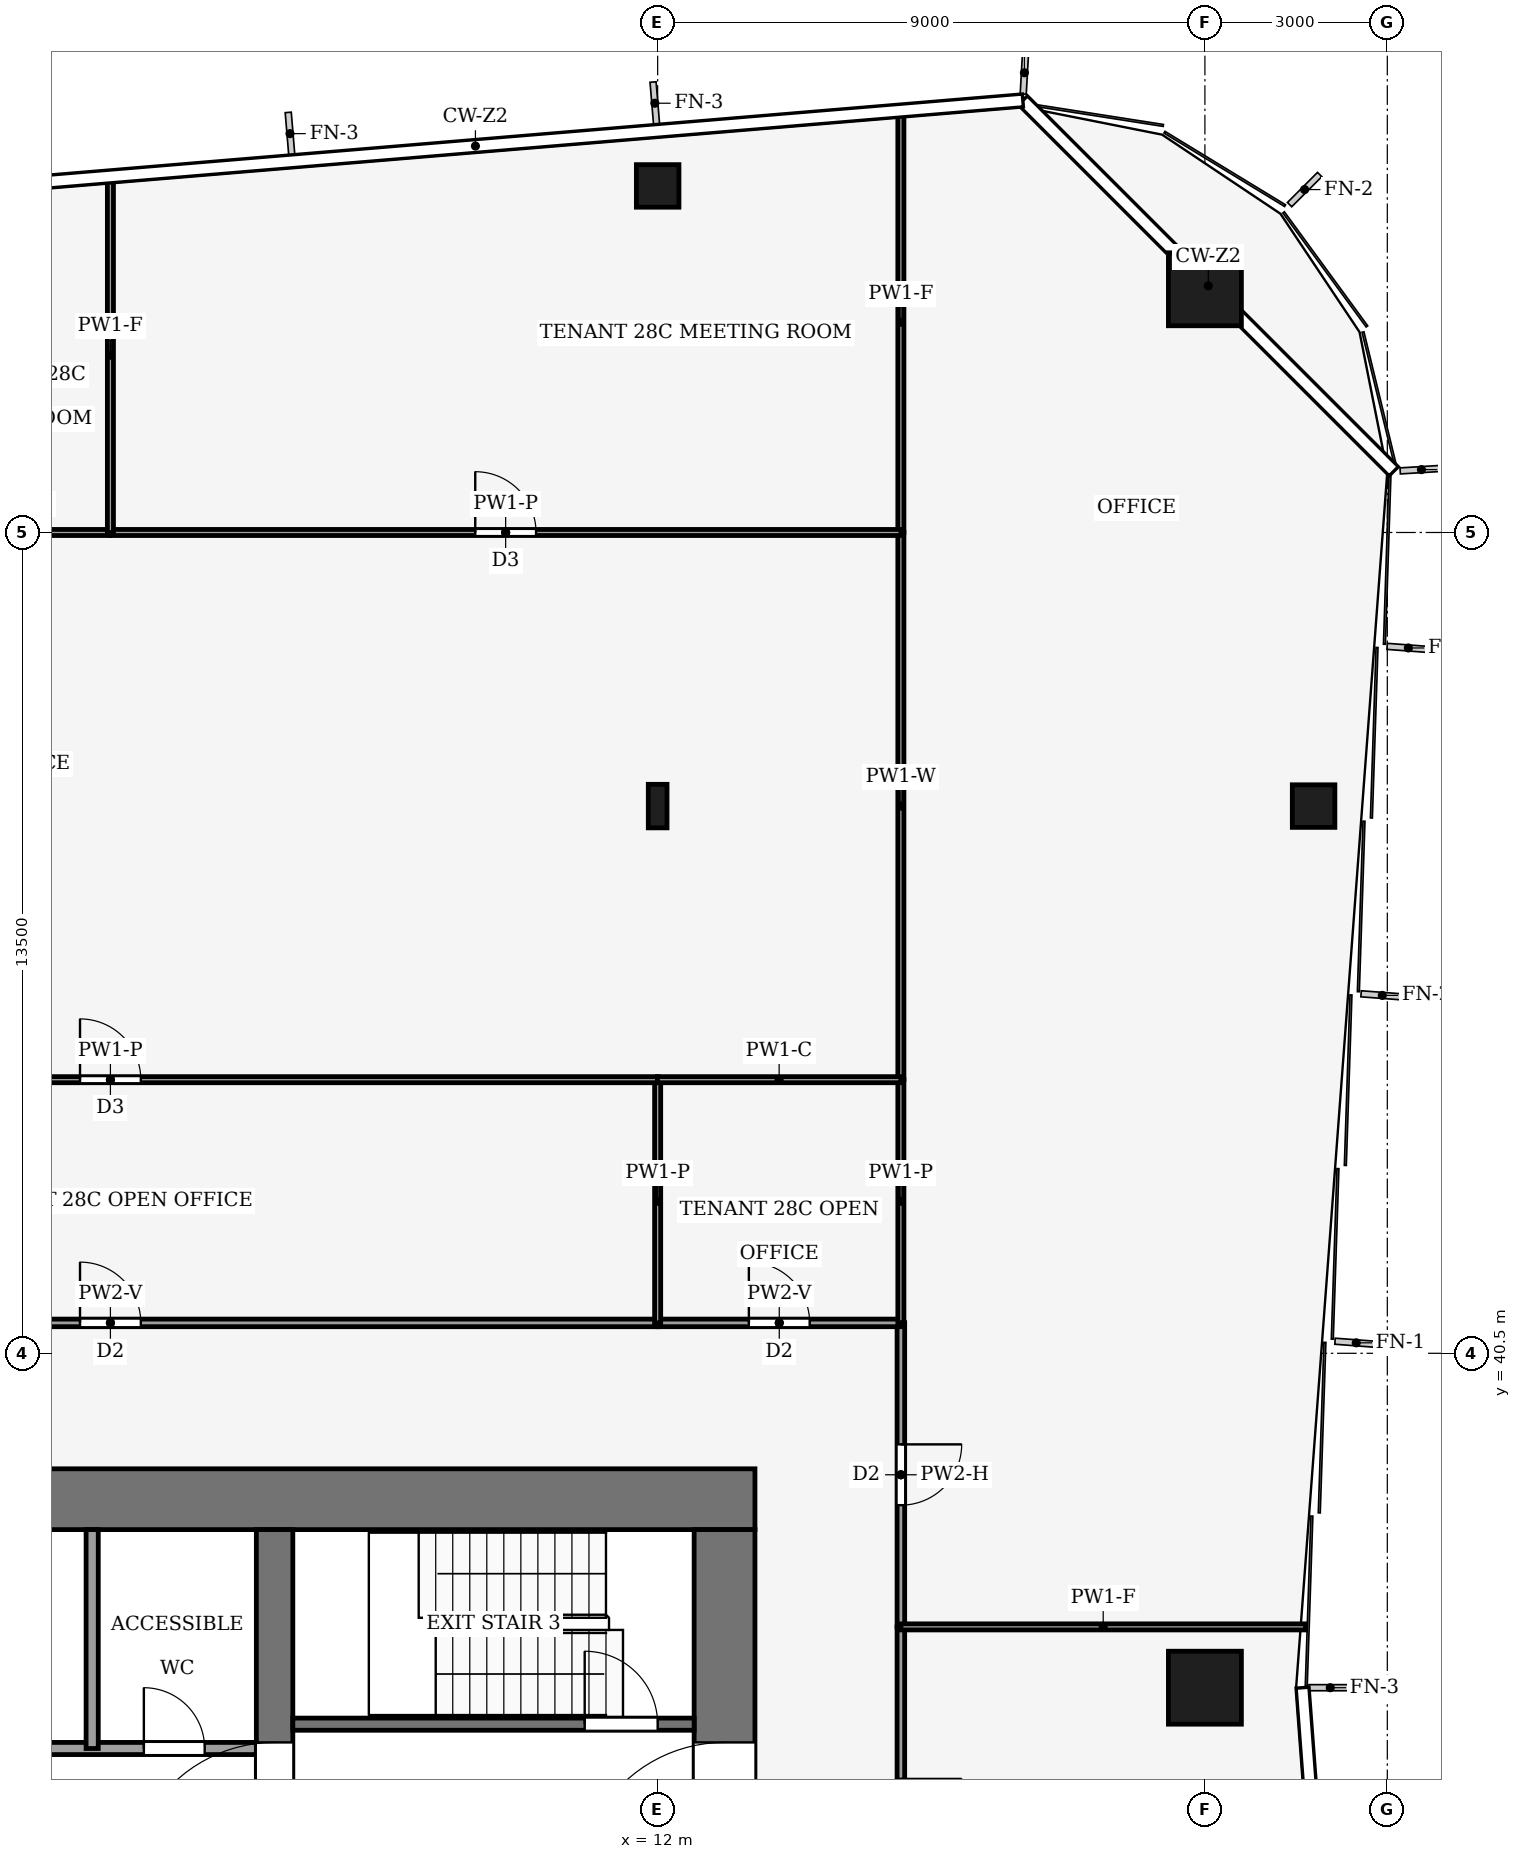
"""IFC4 building model, lengths in metres.
Left out: names, types, materials, properties, quantities, classifications, styles, units other than length and angle.
Written with IfcOpenShell. Run it as: python <this file> out.ifc"""

import sys

from ifc_helpers import new_model, si_unit, direction, frame, frame_2d, origin, origin_2d, place, context, subcontext, project, spatial, rectangle, hollow_rectangle, i_section, extrude, element, fill, save


model = new_model("IFC4")
c1 = context("Model", 3, precision=1e-05, world=origin(), true_north=direction((0.0, 1.0)))
c2 = subcontext(c1, "Body", "Model", "MODEL_VIEW")
j1 = project(units=[si_unit("LENGTHUNIT", "METRE"), si_unit("PLANEANGLEUNIT", "RADIAN")], contexts=[c1])
p1 = place(None, origin())
s1 = spatial("IfcSite", under=j1, at=p1, CompositionType="ELEMENT")
p2 = place(p1, origin())
s2 = spatial("IfcBuilding", under=s1, at=p2, CompositionType="ELEMENT")
p3 = place(p2, frame((0.0, 0.0, 126.0)))
s3 = spatial("IfcBuildingStorey", under=s2, at=p3, CompositionType="ELEMENT", Elevation=126.0)
p4 = place(p3, frame((-13.6, 38.1, -0.13), z_axis=(0.0, 0.0, 1.0), x_axis=(1.0, 0.0, 0.0)))
e1 = element("IfcWall", 1, at=p4, inside=s3, PredefinedType="SHEAR", context=c2, shape_type="SweptSolid", body=[
    extrude(rectangle(XDim=27.2, YDim=1.0, at=frame_2d((13.6, 0.0))), origin(), (0.0, 0.0, 1.0), 4.0),
])
p5 = place(p3, frame((13.1, 18.4, -0.13), z_axis=(0.0, 0.0, 1.0), x_axis=(0.0, 1.0, 0.0)))
e2 = element("IfcWall", 2, at=p5, inside=s3, PredefinedType="SHEAR", context=c2, shape_type="SweptSolid", body=[
    extrude(rectangle(XDim=19.2, YDim=1.0, at=frame_2d((9.6, 0.0))), origin(), (0.0, 0.0, 1.0), 4.0),
])
p6 = place(p5, frame((2.8, 0.0, 0.13)))
e3 = element("IfcOpeningElement", 3, at=p6, cuts=e2, PredefinedType="OPENING", context=c2, shape_type="SweptSolid", body=[
    extrude(rectangle(XDim=2.4, YDim=2.4, at=frame_2d((1.2, 1.2))), frame((0.0, 0.51, 0.0), z_axis=(0.0, -1.0, 0.0), x_axis=(1.0, 0.0, 0.0)), (0.0, 0.0, 1.0), 1.02),
])
p7 = place(p5, frame((13.3, 0.0, 0.13)))
e4 = element("IfcOpeningElement", 4, at=p7, cuts=e2, PredefinedType="OPENING", context=c2, shape_type="SweptSolid", body=[
    extrude(rectangle(XDim=2.4, YDim=2.4, at=frame_2d((1.2, 1.2))), frame((0.0, 0.51, 0.0), z_axis=(0.0, -1.0, 0.0), x_axis=(1.0, 0.0, 0.0)), (0.0, 0.0, 1.0), 1.02),
])
p8 = place(p3, frame((5.7, 18.4, -0.13), z_axis=(0.0, 0.0, 1.0), x_axis=(0.0, 1.0, 0.0)))
e5 = element("IfcWall", 5, at=p8, inside=s3, PredefinedType="SHEAR", context=c2, shape_type="SweptSolid", body=[
    extrude(rectangle(XDim=19.2, YDim=0.6, at=frame_2d((9.6, 0.0))), origin(), (0.0, 0.0, 1.0), 4.0),
])
p9 = place(p8, frame((13.3, 0.0, 0.13)))
e6 = element("IfcOpeningElement", 6, at=p9, cuts=e5, PredefinedType="OPENING", context=c2, shape_type="SweptSolid", body=[
    extrude(rectangle(XDim=2.4, YDim=2.4, at=frame_2d((1.2, 1.2))), frame((0.0, 0.31, 0.0), z_axis=(0.0, -1.0, 0.0), x_axis=(1.0, 0.0, 0.0)), (0.0, 0.0, 1.0), 0.62),
])
for number, where, z_axis, x_axis in (
    (7, (21.0, 58.0, 0.0), (0.0, 0.0, 1.0), (1.0, 0.0, 0.0)),
    (8, (21.0, 35.0, 0.0), (0.0, 0.0, 1.0), (1.0, 0.0, 0.0)),
):
    element("IfcColumn", number, at=place(p3, frame(where, z_axis=z_axis, x_axis=x_axis)), inside=s3, PredefinedType="COLUMN", context=c2, shape_type="SweptSolid", body=[
        extrude(hollow_rectangle(XDim=1.2, YDim=1.2, WallThickness=0.07, at=origin_2d()), origin(), (0.0, 0.0, 1.0), 4.0),
    ])
for number, where, z_axis, x_axis in (
    (9, (12.0, 59.7, 0.0), (0.0, 0.0, 1.0), (1.0, 0.0, 0.0)),
    (10, (22.788, 49.5, 0.0), (0.0, 0.0, 1.0), (1.0, 0.0, 0.0)),
):
    element("IfcColumn", number, at=place(p3, frame(where, z_axis=z_axis, x_axis=x_axis)), inside=s3, PredefinedType="COLUMN", context=c2, shape_type="SweptSolid", body=[
        extrude(hollow_rectangle(XDim=0.7, YDim=0.7, WallThickness=0.03, at=origin_2d()), origin(), (0.0, 0.0, 1.0), 4.0),
    ])
p10 = place(p3, frame((12.0, 49.5, 0.0), z_axis=(0.0, 0.0, 1.0), x_axis=(1.0, 0.0, 0.0)))
e11 = element("IfcColumn", 11, at=p10, inside=s3, PredefinedType="COLUMN", context=c2, shape_type="SweptSolid", body=[
    extrude(i_section(OverallWidth=0.308, OverallDepth=0.716, WebThickness=0.021, FlangeThickness=0.04, FilletRadius=0.027, at=origin_2d()), origin(), (0.0, 0.0, 1.0), 4.0),
])
p11 = place(p3, frame((-5.4, 34.0, 0.0), z_axis=(0.0, 0.0, 1.0), x_axis=(1.0, 0.0, 0.0)))
e12 = element("IfcWall", 12, at=p11, inside=s3, PredefinedType="PARTITIONING", context=c2, shape_type="SweptSolid", body=[
    extrude(rectangle(XDim=10.8, YDim=0.2, at=frame_2d((5.4, 0.0))), origin(), (0.0, 0.0, 1.0), 3.87),
])
p12 = place(p11, frame((6.15, 0.0, 0.0)))
e13 = element("IfcOpeningElement", 13, at=p12, cuts=e12, PredefinedType="OPENING", context=c2, shape_type="SweptSolid", body=[
    extrude(rectangle(XDim=1.2, YDim=2.2, at=frame_2d((0.6, 1.1))), frame((0.0, 0.11, 0.0), z_axis=(0.0, -1.0, 0.0), x_axis=(1.0, 0.0, 0.0)), (0.0, 0.0, 1.0), 0.22),
])
p13 = place(p11, frame((8.95, 0.0, 0.0)))
e14 = element("IfcOpeningElement", 14, at=p13, cuts=e12, PredefinedType="OPENING", context=c2, shape_type="SweptSolid", body=[
    extrude(rectangle(XDim=1.0, YDim=2.1, at=frame_2d((0.5, 1.05))), frame((0.0, 0.11, 0.0), z_axis=(0.0, -1.0, 0.0), x_axis=(1.0, 0.0, 0.0)), (0.0, 0.0, 1.0), 0.22),
])
p14 = place(p3, frame((6.0, 34.4, 0.0), z_axis=(0.0, 0.0, 1.0), x_axis=(1.0, 0.0, 0.0)))
e15 = element("IfcWall", 15, at=p14, inside=s3, PredefinedType="PARTITIONING", context=c2, shape_type="SweptSolid", body=[
    extrude(rectangle(XDim=6.6, YDim=0.2, at=frame_2d((3.3, 0.0))), origin(), (0.0, 0.0, 1.0), 3.87),
])
p15 = place(p14, frame((4.8, 0.0, 0.0)))
e16 = element("IfcOpeningElement", 16, at=p15, cuts=e15, PredefinedType="OPENING", context=c2, shape_type="SweptSolid", body=[
    extrude(rectangle(XDim=1.2, YDim=2.2, at=frame_2d((0.6, 1.1))), frame((0.0, 0.11, 0.0), z_axis=(0.0, -1.0, 0.0), x_axis=(1.0, 0.0, 0.0)), (0.0, 0.0, 1.0), 0.22),
])
p16 = place(p3, frame((2.7, 34.0, 0.0), z_axis=(0.0, 0.0, 1.0), x_axis=(0.0, 1.0, 0.0)))
e17 = element("IfcWall", 17, at=p16, inside=s3, PredefinedType="PARTITIONING", context=c2, shape_type="SweptSolid", body=[
    extrude(rectangle(XDim=3.6, YDim=0.2, at=frame_2d((1.8, 0.0))), origin(), (0.0, 0.0, 1.0), 3.87),
])
p17 = place(p3, frame((16.0, 36.0, 0.0), z_axis=(0.0, 0.0, 1.0), x_axis=(0.0, -1.0, 0.0)))
e18 = element("IfcWall", 18, at=p17, inside=s3, PredefinedType="PARTITIONING", context=c2, shape_type="SweptSolid", body=[
    extrude(rectangle(XDim=6.0, YDim=0.125, at=frame_2d((3.0, 0.0))), origin(), (0.0, 0.0, 1.0), 3.48),
])
p18 = place(p17, frame((2.5, 0.0, 0.0)))
e19 = element("IfcOpeningElement", 19, at=p18, cuts=e18, PredefinedType="OPENING", context=c2, shape_type="SweptSolid", body=[
    extrude(rectangle(XDim=1.0, YDim=2.1, at=frame_2d((0.5, 1.05))), frame((0.0, 0.073, 0.0), z_axis=(0.0, -1.0, 0.0), x_axis=(1.0, 0.0, 0.0)), (0.0, 0.0, 1.0), 0.145),
])
p19 = place(p3, frame((16.0, 41.004, 0.0), z_axis=(0.0, 0.0, 1.0), x_axis=(0.0, -1.0, 0.0)))
e20 = element("IfcWall", 20, at=p19, inside=s3, PredefinedType="PARTITIONING", context=c2, shape_type="SweptSolid", body=[
    extrude(rectangle(XDim=5.004, YDim=0.125, at=frame_2d((2.502, 0.0))), origin(), (0.0, 0.0, 1.0), 3.14),
])
p20 = place(p19, frame((2.002, 0.0, 0.0)))
e21 = element("IfcOpeningElement", 21, at=p20, cuts=e20, PredefinedType="OPENING", context=c2, shape_type="SweptSolid", body=[
    extrude(rectangle(XDim=1.0, YDim=2.1, at=frame_2d((0.5, 1.05))), frame((0.0, 0.073, 0.0), z_axis=(0.0, -1.0, 0.0), x_axis=(1.0, 0.0, 0.0)), (0.0, 0.0, 1.0), 0.145),
])
p21 = place(p3, frame((-6.0, 41.0, 0.0), z_axis=(0.0, 0.0, 1.0), x_axis=(1.0, 0.0, 0.0)))
e22 = element("IfcWall", 22, at=p21, inside=s3, PredefinedType="PARTITIONING", context=c2, shape_type="SweptSolid", body=[
    extrude(rectangle(XDim=18.0, YDim=0.125, at=frame_2d((9.0, 0.0))), origin(), (0.0, 0.0, 1.0), 3.44),
])
p22 = place(p21, frame((8.5, 0.0, 0.0)))
e23 = element("IfcOpeningElement", 23, at=p22, cuts=e22, PredefinedType="OPENING", context=c2, shape_type="SweptSolid", body=[
    extrude(rectangle(XDim=1.0, YDim=2.1, at=frame_2d((0.5, 1.05))), frame((0.0, 0.073, 0.0), z_axis=(0.0, -1.0, 0.0), x_axis=(1.0, 0.0, 0.0)), (0.0, 0.0, 1.0), 0.145),
])
p23 = place(p3, frame((12.0, 41.0, 0.0), z_axis=(0.0, 0.0, 1.0), x_axis=(1.0, 0.0, 0.0)))
e24 = element("IfcWall", 24, at=p23, inside=s3, PredefinedType="PARTITIONING", context=c2, shape_type="SweptSolid", body=[
    extrude(rectangle(XDim=4.0, YDim=0.125, at=frame_2d((2.0, 0.0))), origin(), (0.0, 0.0, 1.0), 3.44),
])
p24 = place(p23, frame((1.5, 0.0, 0.0)))
e25 = element("IfcOpeningElement", 25, at=p24, cuts=e24, PredefinedType="OPENING", context=c2, shape_type="SweptSolid", body=[
    extrude(rectangle(XDim=1.0, YDim=2.1, at=frame_2d((0.5, 1.05))), frame((0.0, 0.073, 0.0), z_axis=(0.0, -1.0, 0.0), x_axis=(1.0, 0.0, 0.0)), (0.0, 0.0, 1.0), 0.145),
])
p25 = place(p3, frame((22.655, 36.0, 0.0), z_axis=(0.0, 0.0, 1.0), x_axis=(-1.0, 0.0, 0.0)))
e26 = element("IfcWall", 26, at=p25, inside=s3, PredefinedType="PARTITIONING", context=c2, shape_type="SweptSolid", body=[
    extrude(rectangle(XDim=6.655, YDim=0.1, at=frame_2d((3.328, 0.0))), origin(), (0.0, 0.0, 1.0), 3.04),
])
p26 = place(p3, frame((16.0, 45.0, 0.0), z_axis=(0.0, 0.0, 1.0), x_axis=(0.0, -1.0, 0.0)))
e27 = element("IfcWall", 27, at=p26, inside=s3, PredefinedType="PARTITIONING", context=c2, shape_type="SweptSolid", body=[
    extrude(rectangle(XDim=4.0, YDim=0.1, at=frame_2d((2.0, 0.0))), origin(), (0.0, 0.0, 1.0), 3.44),
])
p27 = place(p3, frame((16.0, 54.0, 0.0), z_axis=(0.0, 0.0, 1.0), x_axis=(0.0, -1.0, 0.0)))
e28 = element("IfcWall", 28, at=p27, inside=s3, PredefinedType="PARTITIONING", context=c2, shape_type="SweptSolid", body=[
    extrude(rectangle(XDim=9.0, YDim=0.1, at=frame_2d((4.5, 0.0))), origin(), (0.0, 0.0, 1.0), 3.24),
])
p28 = place(p3, frame((16.0, 60.913, 0.0), z_axis=(0.0, 0.0, 1.0), x_axis=(0.0, -1.0, 0.0)))
e29 = element("IfcWall", 29, at=p28, inside=s3, PredefinedType="PARTITIONING", context=c2, shape_type="SweptSolid", body=[
    extrude(rectangle(XDim=6.913, YDim=0.1, at=frame_2d((3.457, 0.0))), origin(), (0.0, 0.0, 1.0), 3.04),
])
p29 = place(p3, frame((12.0, 41.0, 0.0), z_axis=(0.0, 0.0, 1.0), x_axis=(0.0, 1.0, 0.0)))
e30 = element("IfcWall", 30, at=p29, inside=s3, PredefinedType="PARTITIONING", context=c2, shape_type="SweptSolid", body=[
    extrude(rectangle(XDim=4.0, YDim=0.1, at=frame_2d((2.0, 0.0))), origin(), (0.0, 0.0, 1.0), 3.44),
])
p30 = place(p3, frame((-6.004, 45.0, 0.0), z_axis=(0.0, 0.0, 1.0), x_axis=(1.0, 0.0, 0.0)))
e31 = element("IfcWall", 31, at=p30, inside=s3, PredefinedType="PARTITIONING", context=c2, shape_type="SweptSolid", body=[
    extrude(rectangle(XDim=18.008, YDim=0.1, at=frame_2d((9.004, 0.0))), origin(), (0.0, 0.0, 1.0), 3.44),
])
p31 = place(p30, frame((8.504, 0.0, 0.0)))
e32 = element("IfcOpeningElement", 32, at=p31, cuts=e31, PredefinedType="OPENING", context=c2, shape_type="SweptSolid", body=[
    extrude(rectangle(XDim=1.0, YDim=2.1, at=frame_2d((0.5, 1.05))), frame((0.0, 0.06, 0.0), z_axis=(0.0, -1.0, 0.0), x_axis=(1.0, 0.0, 0.0)), (0.0, 0.0, 1.0), 0.12),
])
p32 = place(p3, frame((16.0, 45.0, 0.0), z_axis=(0.0, 0.0, 1.0), x_axis=(-1.0, 0.0, 0.0)))
e33 = element("IfcWall", 33, at=p32, inside=s3, PredefinedType="PARTITIONING", context=c2, shape_type="SweptSolid", body=[
    extrude(rectangle(XDim=4.004, YDim=0.1, at=frame_2d((2.002, 0.0))), origin(), (0.0, 0.0, 1.0), 3.87),
])
p33 = place(p3, frame((0.0, 54.0, 0.0), z_axis=(0.0, 0.0, 1.0), x_axis=(1.0, 0.0, 0.0)))
e34 = element("IfcWall", 34, at=p33, inside=s3, PredefinedType="PARTITIONING", context=c2, shape_type="SweptSolid", body=[
    extrude(rectangle(XDim=3.0, YDim=0.1, at=frame_2d((1.5, 0.0))), origin(), (0.0, 0.0, 1.0), 3.87),
])
p34 = place(p33, frame((1.0, 0.0, 0.0)))
e35 = element("IfcOpeningElement", 35, at=p34, cuts=e34, PredefinedType="OPENING", context=c2, shape_type="SweptSolid", body=[
    extrude(rectangle(XDim=1.0, YDim=2.1, at=frame_2d((0.5, 1.05))), frame((0.0, 0.06, 0.0), z_axis=(0.0, -1.0, 0.0), x_axis=(1.0, 0.0, 0.0)), (0.0, 0.0, 1.0), 0.12),
])
p35 = place(p3, frame((3.0, 54.0, 0.0), z_axis=(0.0, 0.0, 1.0), x_axis=(1.0, 0.0, 0.0)))
e36 = element("IfcWall", 36, at=p35, inside=s3, PredefinedType="PARTITIONING", context=c2, shape_type="SweptSolid", body=[
    extrude(rectangle(XDim=13.0, YDim=0.1, at=frame_2d((6.5, 0.0))), origin(), (0.0, 0.0, 1.0), 3.44),
])
p36 = place(p35, frame((6.0, 0.0, 0.0)))
e37 = element("IfcOpeningElement", 37, at=p36, cuts=e36, PredefinedType="OPENING", context=c2, shape_type="SweptSolid", body=[
    extrude(rectangle(XDim=1.0, YDim=2.1, at=frame_2d((0.5, 1.05))), frame((0.0, 0.06, 0.0), z_axis=(0.0, -1.0, 0.0), x_axis=(1.0, 0.0, 0.0)), (0.0, 0.0, 1.0), 0.12),
])
p37 = place(p3, frame((3.0, 54.0, 0.0), z_axis=(0.0, 0.0, 1.0), x_axis=(0.0, 1.0, 0.0)))
e38 = element("IfcWall", 38, at=p37, inside=s3, PredefinedType="PARTITIONING", context=c2, shape_type="SweptSolid", body=[
    extrude(rectangle(XDim=5.83, YDim=0.1, at=frame_2d((2.915, 0.0))), origin(), (0.0, 0.0, 1.0), 3.04),
])
p38 = place(p13, origin())
e39 = element("IfcDoor", 39, at=p38, inside=s3, OperationType="SINGLE_SWING_LEFT", PredefinedType="DOOR", context=c2, shape_type="SweptSolid", body=[
    extrude(rectangle(XDim=1.0, YDim=2.1, at=frame_2d((0.5, 1.05))), frame((0.0, 0.025, 0.0), z_axis=(0.0, -1.0, 0.0), x_axis=(1.0, 0.0, 0.0)), (0.0, 0.0, 1.0), 0.05),
])
fill(e14, e39)
p39 = place(p15, origin())
e40 = element("IfcDoor", 40, at=p39, inside=s3, OperationType="SINGLE_SWING_RIGHT", PredefinedType="DOOR", context=c2, shape_type="SweptSolid", body=[
    extrude(rectangle(XDim=1.2, YDim=2.2, at=frame_2d((0.6, 1.1))), frame((0.0, 0.025, 0.0), z_axis=(0.0, -1.0, 0.0), x_axis=(1.0, 0.0, 0.0)), (0.0, 0.0, 1.0), 0.05),
])
fill(e16, e40)
p40 = place(p9, origin())
e41 = element("IfcDoor", 41, at=p40, inside=s3, OperationType="DOUBLE_DOOR_SINGLE_SWING", PredefinedType="DOOR", context=c2, shape_type="SweptSolid", body=[
    extrude(rectangle(XDim=2.4, YDim=2.4, at=frame_2d((1.2, 1.2))), frame((0.0, 0.025, 0.0), z_axis=(0.0, -1.0, 0.0), x_axis=(1.0, 0.0, 0.0)), (0.0, 0.0, 1.0), 0.05),
])
fill(e6, e41)
p41 = place(p7, origin())
e42 = element("IfcDoor", 42, at=p41, inside=s3, OperationType="DOUBLE_DOOR_SINGLE_SWING", PredefinedType="DOOR", context=c2, shape_type="SweptSolid", body=[
    extrude(rectangle(XDim=2.4, YDim=2.4, at=frame_2d((1.2, 1.2))), frame((0.0, 0.025, 0.0), z_axis=(0.0, -1.0, 0.0), x_axis=(1.0, 0.0, 0.0)), (0.0, 0.0, 1.0), 0.05),
])
fill(e4, e42)
p42 = place(p20, origin())
e43 = element("IfcDoor", 43, at=p42, inside=s3, OperationType="SINGLE_SWING_LEFT", PredefinedType="DOOR", context=c2, shape_type="SweptSolid", body=[
    extrude(rectangle(XDim=1.0, YDim=2.1, at=frame_2d((0.5, 1.05))), frame((0.0, 0.025, 0.0), z_axis=(0.0, -1.0, 0.0), x_axis=(1.0, 0.0, 0.0)), (0.0, 0.0, 1.0), 0.05),
])
fill(e21, e43)
p43 = place(p22, origin())
e44 = element("IfcDoor", 44, at=p43, inside=s3, OperationType="SINGLE_SWING_LEFT", PredefinedType="DOOR", context=c2, shape_type="SweptSolid", body=[
    extrude(rectangle(XDim=1.0, YDim=2.1, at=frame_2d((0.5, 1.05))), frame((0.0, 0.025, 0.0), z_axis=(0.0, -1.0, 0.0), x_axis=(1.0, 0.0, 0.0)), (0.0, 0.0, 1.0), 0.05),
])
fill(e23, e44)
p44 = place(p24, origin())
e45 = element("IfcDoor", 45, at=p44, inside=s3, OperationType="SINGLE_SWING_RIGHT", PredefinedType="DOOR", context=c2, shape_type="SweptSolid", body=[
    extrude(rectangle(XDim=1.0, YDim=2.1, at=frame_2d((0.5, 1.05))), frame((0.0, 0.025, 0.0), z_axis=(0.0, -1.0, 0.0), x_axis=(1.0, 0.0, 0.0)), (0.0, 0.0, 1.0), 0.05),
])
fill(e25, e45)
p45 = place(p31, origin())
e46 = element("IfcDoor", 46, at=p45, inside=s3, OperationType="SINGLE_SWING_LEFT", PredefinedType="DOOR", context=c2, shape_type="SweptSolid", body=[
    extrude(rectangle(XDim=1.0, YDim=2.1, at=frame_2d((0.5, 1.05))), frame((0.0, 0.025, 0.0), z_axis=(0.0, -1.0, 0.0), x_axis=(1.0, 0.0, 0.0)), (0.0, 0.0, 1.0), 0.05),
])
fill(e32, e46)
p46 = place(p36, origin())
e47 = element("IfcDoor", 47, at=p46, inside=s3, OperationType="SINGLE_SWING_LEFT", PredefinedType="DOOR", context=c2, shape_type="SweptSolid", body=[
    extrude(rectangle(XDim=1.0, YDim=2.1, at=frame_2d((0.5, 1.05))), frame((0.0, 0.025, 0.0), z_axis=(0.0, -1.0, 0.0), x_axis=(1.0, 0.0, 0.0)), (0.0, 0.0, 1.0), 0.05),
])
fill(e37, e47)
save(model, sys.argv[1])
